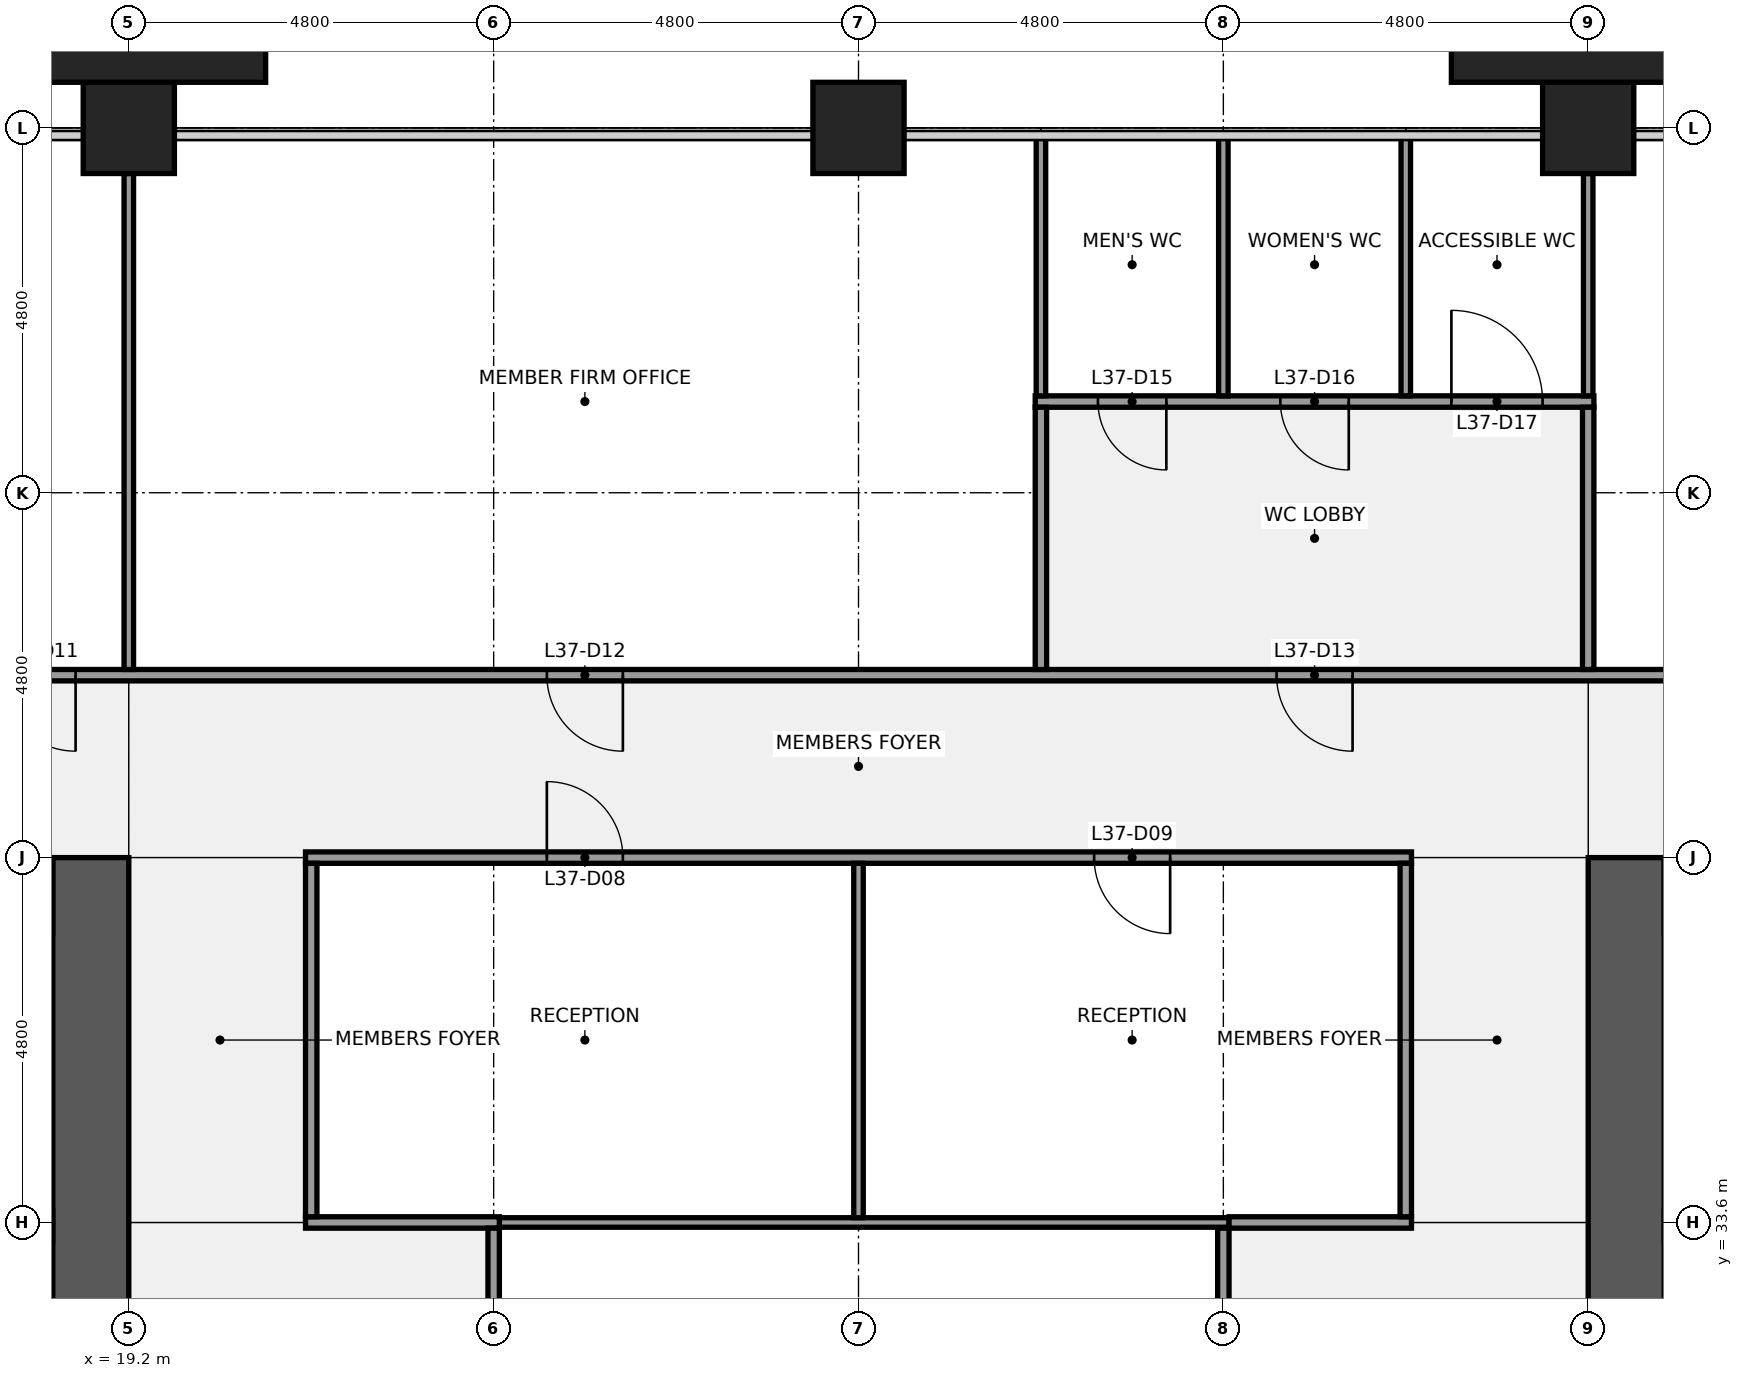
"""IFC4 building model, lengths in metres.
Left out: names, types, materials, properties, quantities, classifications, styles, units other than length and angle.
Written with IfcOpenShell. Run it as: python <this file> out.ifc"""

import sys

from ifc_helpers import new_model, si_unit, direction, frame, frame_2d, origin, origin_2d, place, context, subcontext, project, spatial, rectangle, extrude, element, fill, save


model = new_model("IFC4")
c1 = context("Model", 3, precision=1e-05, world=origin(), true_north=direction((0.0, 1.0)))
c2 = subcontext(c1, "Body", "Model", "MODEL_VIEW")
j1 = project(units=[si_unit("LENGTHUNIT", "METRE"), si_unit("PLANEANGLEUNIT", "RADIAN")], contexts=[c1])
p1 = place(None, origin())
s1 = spatial("IfcSite", under=j1, at=p1, CompositionType="ELEMENT")
p2 = place(p1, origin())
s2 = spatial("IfcBuilding", under=s1, at=p2, CompositionType="ELEMENT")
p3 = place(p2, frame((0.0, 0.0, 168.1)))
s3 = spatial("IfcBuildingStorey", under=s2, at=p3, CompositionType="ELEMENT", Elevation=168.1)
for number, where, z_axis, x_axis in (
    (1, (19.2, 48.0, 0.0), (0.0, 0.0, 1.0), (1.0, 0.0, 0.0)),
    (2, (28.8, 48.0, 0.0), (0.0, 0.0, 1.0), (1.0, 0.0, 0.0)),
    (3, (38.4, 48.0, 0.0), (0.0, 0.0, 1.0), (1.0, 0.0, 0.0)),
):
    element("IfcColumn", number, at=place(p3, frame(where, z_axis=z_axis, x_axis=x_axis)), inside=s3, PredefinedType="COLUMN", context=c2, shape_type="SweptSolid", body=[
        extrude(rectangle(XDim=1.2, YDim=1.2, at=origin_2d()), origin(), (0.0, 0.0, 1.0), 4.0),
    ])
p4 = place(p3, frame((18.7, 38.4, 0.0), z_axis=(0.0, 0.0, 1.0), x_axis=(0.0, -1.0, 0.0)))
e4 = element("IfcWall", 4, at=p4, inside=s3, PredefinedType="SHEAR", context=c2, shape_type="SweptSolid", body=[
    extrude(rectangle(XDim=28.8, YDim=1.0, at=frame_2d((14.4, 0.0))), origin(), (0.0, 0.0, 1.0), 3.84),
])
p5 = place(p4, frame((18.3, 0.0, 0.0)))
e5 = element("IfcOpeningElement", 5, at=p5, cuts=e4, PredefinedType="OPENING", context=c2, shape_type="SweptSolid", body=[
    extrude(rectangle(XDim=1.8, YDim=2.1, at=frame_2d((0.9, 1.05))), frame((0.0, 0.51, 0.0), z_axis=(0.0, -1.0, 0.0), x_axis=(1.0, 0.0, 0.0)), (0.0, 0.0, 1.0), 1.02),
])
p6 = place(p4, frame((8.7, 0.0, 0.0)))
e6 = element("IfcOpeningElement", 6, at=p6, cuts=e4, PredefinedType="OPENING", context=c2, shape_type="SweptSolid", body=[
    extrude(rectangle(XDim=1.8, YDim=2.1, at=frame_2d((0.9, 1.05))), frame((0.0, 0.51, 0.0), z_axis=(0.0, -1.0, 0.0), x_axis=(1.0, 0.0, 0.0)), (0.0, 0.0, 1.0), 1.02),
])
p7 = place(p3, frame((1.0, 33.55, 0.0), z_axis=(0.0, 0.0, 1.0), x_axis=(1.0, 0.0, 0.0)))
e7 = element("IfcWall", 7, at=p7, inside=s3, PredefinedType="SHEAR", context=c2, shape_type="SweptSolid", body=[
    extrude(rectangle(XDim=17.2, YDim=0.4, at=frame_2d((8.6, 0.0))), origin(), (0.0, 0.0, 1.0), 3.84),
])
p8 = place(p3, frame((38.9, 9.6, 0.0), z_axis=(0.0, 0.0, 1.0), x_axis=(0.0, 1.0, 0.0)))
e8 = element("IfcWall", 8, at=p8, inside=s3, PredefinedType="SHEAR", context=c2, shape_type="SweptSolid", body=[
    extrude(rectangle(XDim=28.8, YDim=1.0, at=frame_2d((14.4, 0.0))), origin(), (0.0, 0.0, 1.0), 3.84),
])
p9 = place(p8, frame((8.7, 0.0, 0.0)))
e9 = element("IfcOpeningElement", 9, at=p9, cuts=e8, PredefinedType="OPENING", context=c2, shape_type="SweptSolid", body=[
    extrude(rectangle(XDim=1.8, YDim=2.1, at=frame_2d((0.9, 1.05))), frame((0.0, 0.51, 0.0), z_axis=(0.0, -1.0, 0.0), x_axis=(1.0, 0.0, 0.0)), (0.0, 0.0, 1.0), 1.02),
])
p10 = place(p8, frame((18.3, 0.0, 0.0)))
e10 = element("IfcOpeningElement", 10, at=p10, cuts=e8, PredefinedType="OPENING", context=c2, shape_type="SweptSolid", body=[
    extrude(rectangle(XDim=1.8, YDim=2.1, at=frame_2d((0.9, 1.05))), frame((0.0, 0.51, 0.0), z_axis=(0.0, -1.0, 0.0), x_axis=(1.0, 0.0, 0.0)), (0.0, 0.0, 1.0), 1.02),
])
p11 = place(p3, frame((24.075, 33.6, 0.0), z_axis=(0.0, 0.0, 1.0), x_axis=(1.0, 0.0, 0.0)))
e11 = element("IfcWall", 11, at=p11, inside=s3, PredefinedType="PARTITIONING", context=c2, shape_type="SweptSolid", body=[
    extrude(rectangle(XDim=9.6, YDim=0.125, at=frame_2d((4.8, 0.0))), origin(), (0.0, 0.0, 1.0), 2.936),
])
p12 = place(p3, frame((21.525, 33.6, 0.0), z_axis=(0.0, 0.0, 1.0), x_axis=(1.0, 0.0, 0.0)))
e12 = element("IfcWall", 12, at=p12, inside=s3, PredefinedType="PARTITIONING", context=c2, shape_type="SweptSolid", body=[
    extrude(rectangle(XDim=2.55, YDim=0.15, at=frame_2d((1.275, 0.0))), origin(), (0.0, 0.0, 1.0), 2.936),
])
p13 = place(p3, frame((33.675, 33.6, 0.0), z_axis=(0.0, 0.0, 1.0), x_axis=(1.0, 0.0, 0.0)))
e13 = element("IfcWall", 13, at=p13, inside=s3, PredefinedType="PARTITIONING", context=c2, shape_type="SweptSolid", body=[
    extrude(rectangle(XDim=2.4, YDim=0.15, at=frame_2d((1.2, 0.0))), origin(), (0.0, 0.0, 1.0), 2.936),
])
p14 = place(p3, frame((21.525, 38.4, 0.0), z_axis=(0.0, 0.0, 1.0), x_axis=(1.0, 0.0, 0.0)))
e14 = element("IfcWall", 14, at=p14, inside=s3, PredefinedType="PARTITIONING", context=c2, shape_type="SweptSolid", body=[
    extrude(rectangle(XDim=14.55, YDim=0.15, at=frame_2d((7.275, 0.0))), origin(), (0.0, 0.0, 1.0), 2.936),
])
p15 = place(p14, frame((3.175, 0.0, 0.0)))
e15 = element("IfcOpeningElement", 15, at=p15, cuts=e14, PredefinedType="OPENING", context=c2, shape_type="SweptSolid", body=[
    extrude(rectangle(XDim=1.0, YDim=2.1, at=frame_2d((0.5, 1.05))), frame((0.0, 0.085, 0.0), z_axis=(0.0, -1.0, 0.0), x_axis=(1.0, 0.0, 0.0)), (0.0, 0.0, 1.0), 0.17),
])
p16 = place(p14, frame((10.375, 0.0, 0.0)))
e16 = element("IfcOpeningElement", 16, at=p16, cuts=e14, PredefinedType="OPENING", context=c2, shape_type="SweptSolid", body=[
    extrude(rectangle(XDim=1.0, YDim=2.1, at=frame_2d((0.5, 1.05))), frame((0.0, 0.085, 0.0), z_axis=(0.0, -1.0, 0.0), x_axis=(1.0, 0.0, 0.0)), (0.0, 0.0, 1.0), 0.17),
])
p17 = place(p3, frame((9.7, 40.8, 0.0), z_axis=(0.0, 0.0, 1.0), x_axis=(1.0, 0.0, 0.0)))
e17 = element("IfcWall", 17, at=p17, inside=s3, PredefinedType="PARTITIONING", context=c2, shape_type="SweptSolid", body=[
    extrude(rectangle(XDim=38.2, YDim=0.15, at=frame_2d((19.1, 0.0))), origin(), (0.0, 0.0, 1.0), 2.936),
])
p18 = place(p17, frame((3.05, 0.0, 0.0)))
e18 = element("IfcOpeningElement", 18, at=p18, cuts=e17, PredefinedType="OPENING", context=c2, shape_type="SweptSolid", body=[
    extrude(rectangle(XDim=1.0, YDim=2.1, at=frame_2d((0.5, 1.05))), frame((0.0, 0.085, 0.0), z_axis=(0.0, -1.0, 0.0), x_axis=(1.0, 0.0, 0.0)), (0.0, 0.0, 1.0), 0.17),
])
p19 = place(p17, frame((7.8, 0.0, 0.0)))
e19 = element("IfcOpeningElement", 19, at=p19, cuts=e17, PredefinedType="OPENING", context=c2, shape_type="SweptSolid", body=[
    extrude(rectangle(XDim=1.0, YDim=2.1, at=frame_2d((0.5, 1.05))), frame((0.0, 0.085, 0.0), z_axis=(0.0, -1.0, 0.0), x_axis=(1.0, 0.0, 0.0)), (0.0, 0.0, 1.0), 0.17),
])
p20 = place(p17, frame((15.0, 0.0, 0.0)))
e20 = element("IfcOpeningElement", 20, at=p20, cuts=e17, PredefinedType="OPENING", context=c2, shape_type="SweptSolid", body=[
    extrude(rectangle(XDim=1.0, YDim=2.1, at=frame_2d((0.5, 1.05))), frame((0.0, 0.085, 0.0), z_axis=(0.0, -1.0, 0.0), x_axis=(1.0, 0.0, 0.0)), (0.0, 0.0, 1.0), 0.17),
])
p21 = place(p17, frame((24.6, 0.0, 0.0)))
e21 = element("IfcOpeningElement", 21, at=p21, cuts=e17, PredefinedType="OPENING", context=c2, shape_type="SweptSolid", body=[
    extrude(rectangle(XDim=1.0, YDim=2.1, at=frame_2d((0.5, 1.05))), frame((0.0, 0.085, 0.0), z_axis=(0.0, -1.0, 0.0), x_axis=(1.0, 0.0, 0.0)), (0.0, 0.0, 1.0), 0.17),
])
p22 = place(p17, frame((32.95, 0.0, 0.0)))
e22 = element("IfcOpeningElement", 22, at=p22, cuts=e17, PredefinedType="OPENING", context=c2, shape_type="SweptSolid", body=[
    extrude(rectangle(XDim=1.0, YDim=2.1, at=frame_2d((0.5, 1.05))), frame((0.0, 0.085, 0.0), z_axis=(0.0, -1.0, 0.0), x_axis=(1.0, 0.0, 0.0)), (0.0, 0.0, 1.0), 0.17),
])
p23 = place(p3, frame((31.125, 44.4, 0.0), z_axis=(0.0, 0.0, 1.0), x_axis=(1.0, 0.0, 0.0)))
e23 = element("IfcWall", 23, at=p23, inside=s3, PredefinedType="PARTITIONING", context=c2, shape_type="SweptSolid", body=[
    extrude(rectangle(XDim=7.35, YDim=0.15, at=frame_2d((3.675, 0.0))), origin(), (0.0, 0.0, 1.0), 2.936),
])
p24 = place(p23, frame((0.825, 0.0, 0.0)))
e24 = element("IfcOpeningElement", 24, at=p24, cuts=e23, PredefinedType="OPENING", context=c2, shape_type="SweptSolid", body=[
    extrude(rectangle(XDim=0.9, YDim=2.1, at=frame_2d((0.45, 1.05))), frame((0.0, 0.085, 0.0), z_axis=(0.0, -1.0, 0.0), x_axis=(1.0, 0.0, 0.0)), (0.0, 0.0, 1.0), 0.17),
])
p25 = place(p23, frame((3.225, 0.0, 0.0)))
e25 = element("IfcOpeningElement", 25, at=p25, cuts=e23, PredefinedType="OPENING", context=c2, shape_type="SweptSolid", body=[
    extrude(rectangle(XDim=0.9, YDim=2.1, at=frame_2d((0.45, 1.05))), frame((0.0, 0.085, 0.0), z_axis=(0.0, -1.0, 0.0), x_axis=(1.0, 0.0, 0.0)), (0.0, 0.0, 1.0), 0.17),
])
p26 = place(p23, frame((5.475, 0.0, 0.0)))
e26 = element("IfcOpeningElement", 26, at=p26, cuts=e23, PredefinedType="OPENING", context=c2, shape_type="SweptSolid", body=[
    extrude(rectangle(XDim=1.2, YDim=2.1, at=frame_2d((0.6, 1.05))), frame((0.0, 0.085, 0.0), z_axis=(0.0, -1.0, 0.0), x_axis=(1.0, 0.0, 0.0)), (0.0, 0.0, 1.0), 0.17),
])
p27 = place(p3, frame((19.2, 40.875, 0.0), z_axis=(0.0, 0.0, 1.0), x_axis=(0.0, 1.0, 0.0)))
e27 = element("IfcWall", 27, at=p27, inside=s3, PredefinedType="PARTITIONING", context=c2, shape_type="SweptSolid", body=[
    extrude(rectangle(XDim=6.525, YDim=0.125, at=frame_2d((3.262, 0.0))), origin(), (0.0, 0.0, 1.0), 2.936),
])
p28 = place(p3, frame((21.6, 33.675, 0.0), z_axis=(0.0, 0.0, 1.0), x_axis=(0.0, 1.0, 0.0)))
e28 = element("IfcWall", 28, at=p28, inside=s3, PredefinedType="PARTITIONING", context=c2, shape_type="SweptSolid", body=[
    extrude(rectangle(XDim=4.65, YDim=0.15, at=frame_2d((2.325, 0.0))), origin(), (0.0, 0.0, 1.0), 2.936),
])
p29 = place(p3, frame((24.0, 30.075, 0.0), z_axis=(0.0, 0.0, 1.0), x_axis=(0.0, 1.0, 0.0)))
e29 = element("IfcWall", 29, at=p29, inside=s3, PredefinedType="PARTITIONING", context=c2, shape_type="SweptSolid", body=[
    extrude(rectangle(XDim=3.45, YDim=0.15, at=frame_2d((1.725, 0.0))), origin(), (0.0, 0.0, 1.0), 2.936),
])
p30 = place(p3, frame((28.8, 33.663, 0.0), z_axis=(0.0, 0.0, 1.0), x_axis=(0.0, 1.0, 0.0)))
e30 = element("IfcWall", 30, at=p30, inside=s3, PredefinedType="PARTITIONING", context=c2, shape_type="SweptSolid", body=[
    extrude(rectangle(XDim=4.662, YDim=0.125, at=frame_2d((2.331, 0.0))), origin(), (0.0, 0.0, 1.0), 2.936),
])
p31 = place(p3, frame((31.2, 44.475, 0.0), z_axis=(0.0, 0.0, 1.0), x_axis=(0.0, 1.0, 0.0)))
e31 = element("IfcWall", 31, at=p31, inside=s3, PredefinedType="PARTITIONING", context=c2, shape_type="SweptSolid", body=[
    extrude(rectangle(XDim=3.425, YDim=0.125, at=frame_2d((1.712, 0.0))), origin(), (0.0, 0.0, 1.0), 2.936),
])
p32 = place(p3, frame((31.2, 40.875, 0.0), z_axis=(0.0, 0.0, 1.0), x_axis=(0.0, 1.0, 0.0)))
e32 = element("IfcWall", 32, at=p32, inside=s3, PredefinedType="PARTITIONING", context=c2, shape_type="SweptSolid", body=[
    extrude(rectangle(XDim=3.45, YDim=0.15, at=frame_2d((1.725, 0.0))), origin(), (0.0, 0.0, 1.0), 2.936),
])
p33 = place(p3, frame((33.6, 44.475, 0.0), z_axis=(0.0, 0.0, 1.0), x_axis=(0.0, 1.0, 0.0)))
e33 = element("IfcWall", 33, at=p33, inside=s3, PredefinedType="PARTITIONING", context=c2, shape_type="SweptSolid", body=[
    extrude(rectangle(XDim=3.425, YDim=0.125, at=frame_2d((1.712, 0.0))), origin(), (0.0, 0.0, 1.0), 2.936),
])
p34 = place(p3, frame((33.6, 30.075, 0.0), z_axis=(0.0, 0.0, 1.0), x_axis=(0.0, 1.0, 0.0)))
e34 = element("IfcWall", 34, at=p34, inside=s3, PredefinedType="PARTITIONING", context=c2, shape_type="SweptSolid", body=[
    extrude(rectangle(XDim=3.45, YDim=0.15, at=frame_2d((1.725, 0.0))), origin(), (0.0, 0.0, 1.0), 2.936),
])
p35 = place(p3, frame((36.0, 44.475, 0.0), z_axis=(0.0, 0.0, 1.0), x_axis=(0.0, 1.0, 0.0)))
e35 = element("IfcWall", 35, at=p35, inside=s3, PredefinedType="PARTITIONING", context=c2, shape_type="SweptSolid", body=[
    extrude(rectangle(XDim=3.425, YDim=0.125, at=frame_2d((1.712, 0.0))), origin(), (0.0, 0.0, 1.0), 2.936),
])
p36 = place(p3, frame((36.0, 33.675, 0.0), z_axis=(0.0, 0.0, 1.0), x_axis=(0.0, 1.0, 0.0)))
e36 = element("IfcWall", 36, at=p36, inside=s3, PredefinedType="PARTITIONING", context=c2, shape_type="SweptSolid", body=[
    extrude(rectangle(XDim=4.65, YDim=0.15, at=frame_2d((2.325, 0.0))), origin(), (0.0, 0.0, 1.0), 2.936),
])
p37 = place(p3, frame((38.4, 44.475, 0.0), z_axis=(0.0, 0.0, 1.0), x_axis=(0.0, 1.0, 0.0)))
e37 = element("IfcWall", 37, at=p37, inside=s3, PredefinedType="PARTITIONING", context=c2, shape_type="SweptSolid", body=[
    extrude(rectangle(XDim=2.925, YDim=0.125, at=frame_2d((1.462, 0.0))), origin(), (0.0, 0.0, 1.0), 2.936),
])
p38 = place(p3, frame((38.4, 40.875, 0.0), z_axis=(0.0, 0.0, 1.0), x_axis=(0.0, 1.0, 0.0)))
e38 = element("IfcWall", 38, at=p38, inside=s3, PredefinedType="PARTITIONING", context=c2, shape_type="SweptSolid", body=[
    extrude(rectangle(XDim=3.45, YDim=0.15, at=frame_2d((1.725, 0.0))), origin(), (0.0, 0.0, 1.0), 2.936),
])
for number, where, z_axis, x_axis in (
    (39, (19.2, 49.05, 0.0), (0.0, 0.0, 1.0), (1.0, 0.0, 0.0)),
    (40, (38.4, 49.05, 0.0), (0.0, 0.0, 1.0), (1.0, 0.0, 0.0)),
):
    element("IfcColumn", number, at=place(p3, frame(where, z_axis=z_axis, x_axis=x_axis)), inside=s3, PredefinedType="PILASTER", context=c2, shape_type="SweptSolid", body=[
        extrude(rectangle(XDim=3.6, YDim=0.9, at=origin_2d()), origin(), (0.0, 0.0, 1.0), 4.0),
    ])
p39 = place(p15, origin())
e41 = element("IfcDoor", 41, at=p39, inside=s3, OperationType="SINGLE_SWING_LEFT", PredefinedType="DOOR", context=c2, shape_type="SweptSolid", body=[
    extrude(rectangle(XDim=1.0, YDim=2.1, at=frame_2d((0.5, 1.05))), frame((0.0, 0.025, 0.0), z_axis=(0.0, -1.0, 0.0), x_axis=(1.0, 0.0, 0.0)), (0.0, 0.0, 1.0), 0.05),
])
fill(e15, e41)
p40 = place(p16, origin())
e42 = element("IfcDoor", 42, at=p40, inside=s3, OperationType="SINGLE_SWING_RIGHT", PredefinedType="DOOR", context=c2, shape_type="SweptSolid", body=[
    extrude(rectangle(XDim=1.0, YDim=2.1, at=frame_2d((0.5, 1.05))), frame((0.0, 0.025, 0.0), z_axis=(0.0, -1.0, 0.0), x_axis=(1.0, 0.0, 0.0)), (0.0, 0.0, 1.0), 0.05),
])
fill(e16, e42)
p41 = place(p19, origin())
e43 = element("IfcDoor", 43, at=p41, inside=s3, OperationType="SINGLE_SWING_RIGHT", PredefinedType="DOOR", context=c2, shape_type="SweptSolid", body=[
    extrude(rectangle(XDim=1.0, YDim=2.1, at=frame_2d((0.5, 1.05))), frame((0.0, 0.025, 0.0), z_axis=(0.0, -1.0, 0.0), x_axis=(1.0, 0.0, 0.0)), (0.0, 0.0, 1.0), 0.05),
])
fill(e19, e43)
p42 = place(p20, origin())
e44 = element("IfcDoor", 44, at=p42, inside=s3, OperationType="SINGLE_SWING_RIGHT", PredefinedType="DOOR", context=c2, shape_type="SweptSolid", body=[
    extrude(rectangle(XDim=1.0, YDim=2.1, at=frame_2d((0.5, 1.05))), frame((0.0, 0.025, 0.0), z_axis=(0.0, -1.0, 0.0), x_axis=(1.0, 0.0, 0.0)), (0.0, 0.0, 1.0), 0.05),
])
fill(e20, e44)
p43 = place(p21, origin())
e45 = element("IfcDoor", 45, at=p43, inside=s3, OperationType="SINGLE_SWING_RIGHT", PredefinedType="DOOR", context=c2, shape_type="SweptSolid", body=[
    extrude(rectangle(XDim=1.0, YDim=2.1, at=frame_2d((0.5, 1.05))), frame((0.0, 0.025, 0.0), z_axis=(0.0, -1.0, 0.0), x_axis=(1.0, 0.0, 0.0)), (0.0, 0.0, 1.0), 0.05),
])
fill(e21, e45)
p44 = place(p24, origin())
e46 = element("IfcDoor", 46, at=p44, inside=s3, OperationType="SINGLE_SWING_RIGHT", PredefinedType="DOOR", context=c2, shape_type="SweptSolid", body=[
    extrude(rectangle(XDim=0.9, YDim=2.1, at=frame_2d((0.45, 1.05))), frame((0.0, 0.025, 0.0), z_axis=(0.0, -1.0, 0.0), x_axis=(1.0, 0.0, 0.0)), (0.0, 0.0, 1.0), 0.05),
])
fill(e24, e46)
p45 = place(p25, origin())
e47 = element("IfcDoor", 47, at=p45, inside=s3, OperationType="SINGLE_SWING_RIGHT", PredefinedType="DOOR", context=c2, shape_type="SweptSolid", body=[
    extrude(rectangle(XDim=0.9, YDim=2.1, at=frame_2d((0.45, 1.05))), frame((0.0, 0.025, 0.0), z_axis=(0.0, -1.0, 0.0), x_axis=(1.0, 0.0, 0.0)), (0.0, 0.0, 1.0), 0.05),
])
fill(e25, e47)
p46 = place(p26, origin())
e48 = element("IfcDoor", 48, at=p46, inside=s3, OperationType="SINGLE_SWING_LEFT", PredefinedType="DOOR", context=c2, shape_type="SweptSolid", body=[
    extrude(rectangle(XDim=1.2, YDim=2.1, at=frame_2d((0.6, 1.05))), frame((0.0, 0.025, 0.0), z_axis=(0.0, -1.0, 0.0), x_axis=(1.0, 0.0, 0.0)), (0.0, 0.0, 1.0), 0.05),
])
fill(e26, e48)
save(model, sys.argv[1])
